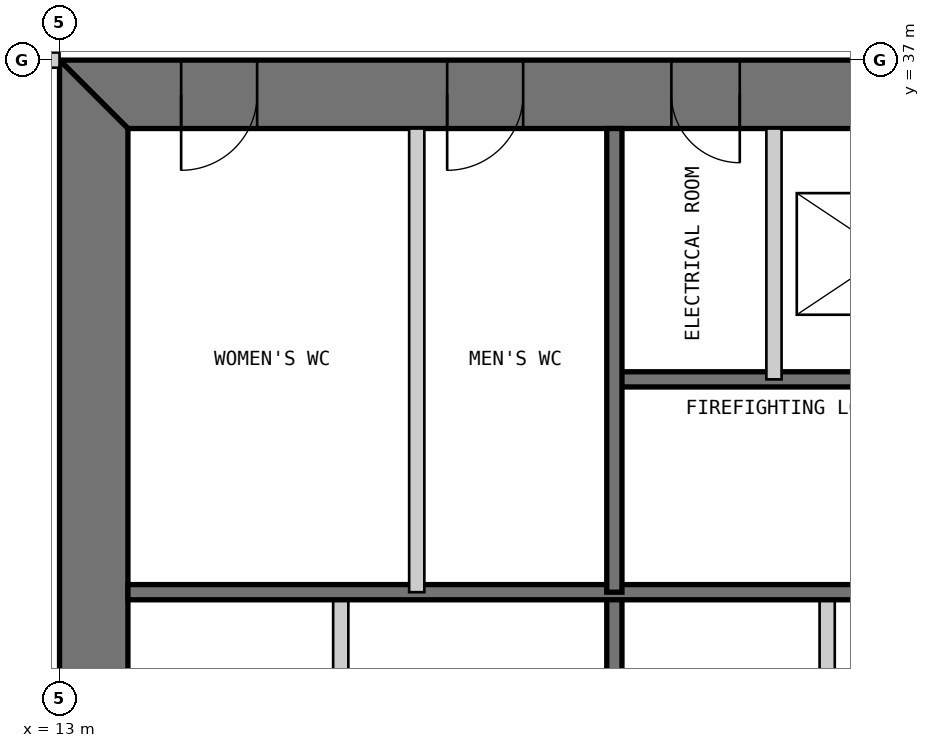
"""IFC4 building model, lengths in metres.
Left out: names, types, materials, properties, quantities, classifications, styles, units other than length and angle.
Written with IfcOpenShell. Run it as: python <this file> out.ifc"""

import sys

from ifc_helpers import new_model, si_unit, direction, frame, frame_2d, origin, place, context, subcontext, project, spatial, polyline, rectangle, outline, extrude, element, fill, save


model = new_model("IFC4")
c1 = context("Model", 3, precision=1e-05, world=origin(), true_north=direction((0.0, 1.0)))
c2 = subcontext(c1, "Body", "Model", "MODEL_VIEW")
j1 = project(units=[si_unit("LENGTHUNIT", "METRE"), si_unit("PLANEANGLEUNIT", "RADIAN")], contexts=[c1])
p1 = place(None, origin())
s1 = spatial("IfcSite", under=j1, at=p1, CompositionType="ELEMENT")
p2 = place(p1, origin())
s2 = spatial("IfcBuilding", under=s1, at=p2, CompositionType="ELEMENT")
p3 = place(p2, frame((0.0, 0.0, 11.8)))
s3 = spatial("IfcBuildingStorey", under=s2, at=p3, CompositionType="ELEMENT", Elevation=11.8)
p4 = place(p3, frame((37.0, 36.55, 0.0), z_axis=(0.0, 0.0, 1.0), x_axis=(-1.0, 0.0, 0.0)))
e1 = element("IfcWall", 1, at=p4, inside=s3, PredefinedType="SHEAR", context=c2, shape_type="SweptSolid", body=[
    extrude(outline(polyline([(0.0, -0.45), (24.0, -0.45), (23.1, 0.45), (0.9, 0.45), (0.0, -0.45)])), origin(), (0.0, 0.0, 1.0), 4.8),
])
p5 = place(p4, frame((4.9, 0.0, 0.0)))
e2 = element("IfcOpeningElement", 2, at=p5, cuts=e1, PredefinedType="OPENING", context=c2, shape_type="SweptSolid", body=[
    extrude(rectangle(XDim=1.0, YDim=2.2, at=frame_2d((0.5, 1.1))), frame((0.0, 0.46, 0.0), z_axis=(0.0, -1.0, 0.0), x_axis=(1.0, 0.0, 0.0)), (0.0, 0.0, 1.0), 0.92),
])
p6 = place(p4, frame((8.9, 0.0, 0.0)))
e3 = element("IfcOpeningElement", 3, at=p6, cuts=e1, PredefinedType="OPENING", context=c2, shape_type="SweptSolid", body=[
    extrude(rectangle(XDim=1.1, YDim=2.2, at=frame_2d((0.55, 1.1))), frame((0.0, 0.46, 0.0), z_axis=(0.0, -1.0, 0.0), x_axis=(1.0, 0.0, 0.0)), (0.0, 0.0, 1.0), 0.92),
])
p7 = place(p4, frame((15.05, 0.0, 0.0)))
e4 = element("IfcOpeningElement", 4, at=p7, cuts=e1, PredefinedType="OPENING", context=c2, shape_type="SweptSolid", body=[
    extrude(rectangle(XDim=0.9, YDim=2.2, at=frame_2d((0.45, 1.1))), frame((0.0, 0.46, 0.0), z_axis=(0.0, -1.0, 0.0), x_axis=(1.0, 0.0, 0.0)), (0.0, 0.0, 1.0), 0.92),
])
p8 = place(p4, frame((17.9, 0.0, 0.0)))
e5 = element("IfcOpeningElement", 5, at=p8, cuts=e1, PredefinedType="OPENING", context=c2, shape_type="SweptSolid", body=[
    extrude(rectangle(XDim=1.0, YDim=2.2, at=frame_2d((0.5, 1.1))), frame((0.0, 0.46, 0.0), z_axis=(0.0, -1.0, 0.0), x_axis=(1.0, 0.0, 0.0)), (0.0, 0.0, 1.0), 0.92),
])
p9 = place(p4, frame((21.4, 0.0, 0.0)))
e6 = element("IfcOpeningElement", 6, at=p9, cuts=e1, PredefinedType="OPENING", context=c2, shape_type="SweptSolid", body=[
    extrude(rectangle(XDim=1.0, YDim=2.2, at=frame_2d((0.5, 1.1))), frame((0.0, 0.46, 0.0), z_axis=(0.0, -1.0, 0.0), x_axis=(1.0, 0.0, 0.0)), (0.0, 0.0, 1.0), 0.92),
])
p10 = place(p3, frame((13.45, 36.1, 0.0), z_axis=(0.0, 0.0, 1.0), x_axis=(0.0, -1.0, 0.0)))
e7 = element("IfcWall", 7, at=p10, inside=s3, PredefinedType="SHEAR", context=c2, shape_type="SweptSolid", body=[
    extrude(outline(polyline([(-0.9, -0.45), (23.1, -0.45), (22.2, 0.45), (0.0, 0.45), (-0.9, -0.45)])), origin(), (0.0, 0.0, 1.0), 4.8),
])
p11 = place(p10, frame((20.2, 0.0, 0.0)))
e8 = element("IfcOpeningElement", 8, at=p11, cuts=e7, PredefinedType="OPENING", context=c2, shape_type="SweptSolid", body=[
    extrude(rectangle(XDim=1.0, YDim=2.2, at=frame_2d((0.5, 1.1))), frame((0.0, 0.46, 0.0), z_axis=(0.0, -1.0, 0.0), x_axis=(1.0, 0.0, 0.0)), (0.0, 0.0, 1.0), 0.92),
])
p12 = place(p10, frame((17.25, 0.0, 0.0)))
e9 = element("IfcOpeningElement", 9, at=p12, cuts=e7, PredefinedType="OPENING", context=c2, shape_type="SweptSolid", body=[
    extrude(rectangle(XDim=0.9, YDim=2.2, at=frame_2d((0.45, 1.1))), frame((0.0, 0.46, 0.0), z_axis=(0.0, -1.0, 0.0), x_axis=(1.0, 0.0, 0.0)), (0.0, 0.0, 1.0), 0.92),
])
p13 = place(p3, frame((16.7, 13.9, 0.0), z_axis=(0.0, 0.0, 1.0), x_axis=(0.0, 1.0, 0.0)))
e10 = element("IfcWall", 10, at=p13, inside=s3, PredefinedType="PARTITIONING", context=c2, shape_type="SweptSolid", body=[
    extrude(rectangle(XDim=16.1, YDim=0.2, at=frame_2d((8.05, 0.0))), origin(), (0.0, 0.0, 1.0), 4.6),
])
p14 = place(p13, frame((4.4, 0.0, 0.0)))
e11 = element("IfcOpeningElement", 11, at=p14, cuts=e10, PredefinedType="OPENING", context=c2, shape_type="SweptSolid", body=[
    extrude(rectangle(XDim=0.9, YDim=2.2, at=frame_2d((0.45, 1.1))), frame((0.0, 0.11, 0.0), z_axis=(0.0, -1.0, 0.0), x_axis=(1.0, 0.0, 0.0)), (0.0, 0.0, 1.0), 0.22),
])
p15 = place(p3, frame((20.3, 13.9, 0.0), z_axis=(0.0, 0.0, 1.0), x_axis=(0.0, 1.0, 0.0)))
e12 = element("IfcWall", 12, at=p15, inside=s3, PredefinedType="SOLIDWALL", context=c2, shape_type="SweptSolid", body=[
    extrude(rectangle(XDim=16.1, YDim=0.2, at=frame_2d((8.05, 0.0))), origin(), (0.0, 0.0, 1.0), 4.6),
])
p16 = place(p3, frame((23.1, 20.0, 0.0), z_axis=(0.0, 0.0, 1.0), x_axis=(0.0, 1.0, 0.0)))
e13 = element("IfcWall", 13, at=p16, inside=s3, PredefinedType="PARTITIONING", context=c2, shape_type="SweptSolid", body=[
    extrude(rectangle(XDim=10.0, YDim=0.2, at=frame_2d((5.0, 0.0))), origin(), (0.0, 0.0, 1.0), 4.6),
])
p17 = place(p3, frame((29.7, 32.8, 0.0), z_axis=(0.0, 0.0, 1.0), x_axis=(-1.0, 0.0, 0.0)))
e14 = element("IfcWall", 14, at=p17, inside=s3, PredefinedType="SOLIDWALL", context=c2, shape_type="SweptSolid", body=[
    extrude(rectangle(XDim=9.4, YDim=0.2, at=frame_2d((4.7, 0.0))), origin(), (0.0, 0.0, 1.0), 4.6),
])
p18 = place(p17, frame((0.25, 0.0, 0.0)))
e15 = element("IfcOpeningElement", 15, at=p18, cuts=e14, PredefinedType="OPENING", context=c2, shape_type="SweptSolid", body=[
    extrude(rectangle(XDim=1.0, YDim=2.2, at=frame_2d((0.5, 1.1))), frame((0.0, 0.11, 0.0), z_axis=(0.0, -1.0, 0.0), x_axis=(1.0, 0.0, 0.0)), (0.0, 0.0, 1.0), 0.22),
])
p19 = place(p3, frame((29.7, 30.0, 0.0), z_axis=(0.0, 0.0, 1.0), x_axis=(-1.0, 0.0, 0.0)))
e16 = element("IfcWall", 16, at=p19, inside=s3, PredefinedType="SOLIDWALL", context=c2, shape_type="SweptSolid", body=[
    extrude(rectangle(XDim=15.8, YDim=0.2, at=frame_2d((7.9, 0.0))), origin(), (0.0, 0.0, 1.0), 4.6),
])
p20 = place(p3, frame((22.4, 36.1, 0.0), z_axis=(0.0, 0.0, 1.0), x_axis=(0.0, -1.0, 0.0)))
e17 = element("IfcWall", 17, at=p20, inside=s3, PredefinedType="PARTITIONING", context=c2, shape_type="SweptSolid", body=[
    extrude(rectangle(XDim=3.3, YDim=0.2, at=frame_2d((1.65, 0.0))), origin(), (0.0, 0.0, 1.0), 4.6),
])
p21 = place(p3, frame((20.3, 36.1, 0.0), z_axis=(0.0, 0.0, 1.0), x_axis=(0.0, -1.0, 0.0)))
e18 = element("IfcWall", 18, at=p21, inside=s3, PredefinedType="SOLIDWALL", context=c2, shape_type="SweptSolid", body=[
    extrude(rectangle(XDim=6.1, YDim=0.2, at=frame_2d((3.05, 0.0))), origin(), (0.0, 0.0, 1.0), 4.6),
])
p22 = place(p3, frame((17.7, 36.1, 0.0), z_axis=(0.0, 0.0, 1.0), x_axis=(0.0, -1.0, 0.0)))
e19 = element("IfcWall", 19, at=p22, inside=s3, PredefinedType="PARTITIONING", context=c2, shape_type="SweptSolid", body=[
    extrude(rectangle(XDim=6.1, YDim=0.2, at=frame_2d((3.05, 0.0))), origin(), (0.0, 0.0, 1.0), 4.6),
])
p23 = place(p3, frame((7.0, 37.0, 0.0), z_axis=(0.0, 0.0, 1.0), x_axis=(1.0, 0.0, 0.0)))
e20 = element("IfcWall", 20, at=p23, inside=s3, PredefinedType="PARTITIONING", context=c2, shape_type="SweptSolid", body=[
    extrude(rectangle(XDim=6.0, YDim=0.2, at=frame_2d((3.0, 0.0))), origin(), (0.0, 0.0, 1.0), 3.653),
])
p24 = place(p7, origin())
e21 = element("IfcDoor", 21, at=p24, inside=s3, OperationType="SINGLE_SWING_LEFT", PredefinedType="DOOR", context=c2, shape_type="SweptSolid", body=[
    extrude(rectangle(XDim=0.9, YDim=2.2, at=frame_2d((0.45, 1.1))), frame((0.0, 0.025, 0.0), z_axis=(0.0, -1.0, 0.0), x_axis=(1.0, 0.0, 0.0)), (0.0, 0.0, 1.0), 0.05),
    extrude(outline(polyline([(0.0, 0.0), (0.04, 0.0), (0.04, 2.16), (0.86, 2.16), (0.86, 0.0), (0.9, 0.0), (0.9, 2.2), (0.0, 2.2), (0.0, 0.0)])), frame((0.0, 0.3, 0.0), z_axis=(0.0, -1.0, 0.0), x_axis=(1.0, 0.0, 0.0)), (0.0, 0.0, 1.0), 0.6),
])
fill(e4, e21)
p25 = place(p8, origin())
e22 = element("IfcDoor", 22, at=p25, inside=s3, OperationType="SINGLE_SWING_RIGHT", PredefinedType="DOOR", context=c2, shape_type="SweptSolid", body=[
    extrude(rectangle(XDim=1.0, YDim=2.2, at=frame_2d((0.5, 1.1))), frame((0.0, 0.025, 0.0), z_axis=(0.0, -1.0, 0.0), x_axis=(1.0, 0.0, 0.0)), (0.0, 0.0, 1.0), 0.05),
    extrude(outline(polyline([(0.0, 0.0), (0.04, 0.0), (0.04, 2.16), (0.96, 2.16), (0.96, 0.0), (1.0, 0.0), (1.0, 2.2), (0.0, 2.2), (0.0, 0.0)])), frame((0.0, 0.3, 0.0), z_axis=(0.0, -1.0, 0.0), x_axis=(1.0, 0.0, 0.0)), (0.0, 0.0, 1.0), 0.6),
])
fill(e5, e22)
p26 = place(p9, origin())
e23 = element("IfcDoor", 23, at=p26, inside=s3, OperationType="SINGLE_SWING_RIGHT", PredefinedType="DOOR", context=c2, shape_type="SweptSolid", body=[
    extrude(rectangle(XDim=1.0, YDim=2.2, at=frame_2d((0.5, 1.1))), frame((0.0, 0.025, 0.0), z_axis=(0.0, -1.0, 0.0), x_axis=(1.0, 0.0, 0.0)), (0.0, 0.0, 1.0), 0.05),
    extrude(outline(polyline([(0.0, 0.0), (0.04, 0.0), (0.04, 2.16), (0.96, 2.16), (0.96, 0.0), (1.0, 0.0), (1.0, 2.2), (0.0, 2.2), (0.0, 0.0)])), frame((0.0, 0.3, 0.0), z_axis=(0.0, -1.0, 0.0), x_axis=(1.0, 0.0, 0.0)), (0.0, 0.0, 1.0), 0.6),
])
fill(e6, e23)
save(model, sys.argv[1])
